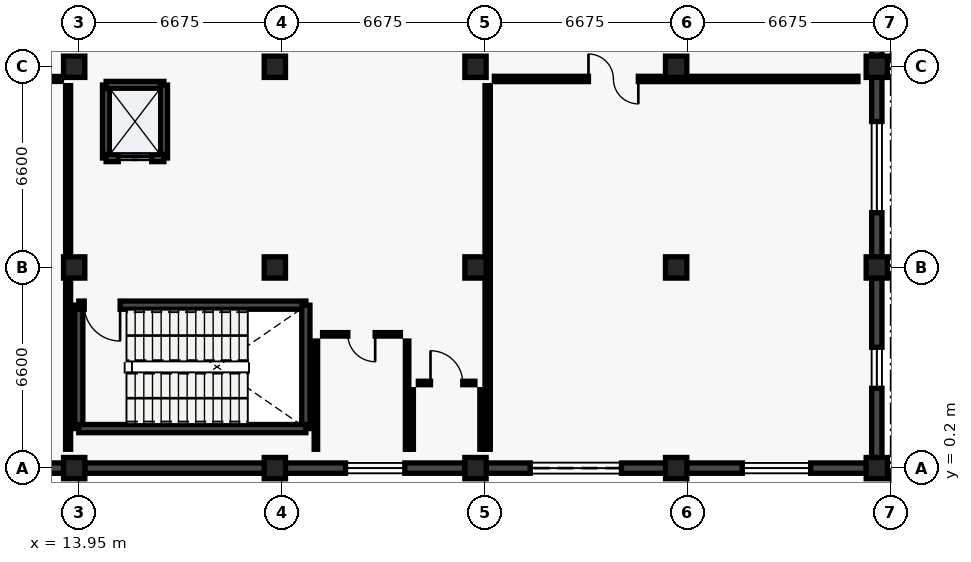
"""IFC4 building model, lengths in metres.
Left out: names, types, materials, properties, quantities, classifications, styles, units other than length and angle.
Written with IfcOpenShell. Run it as: python <this file> out.ifc"""

import sys

from ifc_helpers import new_model, si_unit, direction, frame, frame_2d, origin, origin_2d, place, context, subcontext, project, spatial, rectangle, extrude, element, fill, save


model = new_model("IFC4")
c1 = context("Model", 3, precision=1e-05, world=origin(), true_north=direction((0.0, 1.0)))
c2 = subcontext(c1, "Body", "Model", "MODEL_VIEW")
j1 = project(units=[si_unit("LENGTHUNIT", "METRE"), si_unit("PLANEANGLEUNIT", "RADIAN")], contexts=[c1])
p1 = place(None, origin())
s1 = spatial("IfcSite", under=j1, at=p1, CompositionType="ELEMENT")
p2 = place(p1, origin())
s2 = spatial("IfcBuilding", under=s1, at=p2, CompositionType="ELEMENT")
p3 = place(p2, origin())
s3 = spatial("IfcBuildingStorey", under=s2, at=p3, CompositionType="ELEMENT", Elevation=0.0)
for number, where, z_axis, x_axis in (
    (1, (13.8, 0.2, 0.0), (0.0, 0.0, 1.0), (1.0, 0.0, 0.0)),
    (2, (13.8, 6.8, 0.0), (0.0, 0.0, 1.0), (1.0, 0.0, 0.0)),
    (3, (13.8, 13.4, 0.0), (0.0, 0.0, 1.0), (1.0, 0.0, 0.0)),
    (4, (20.4, 0.2, 0.0), (0.0, 0.0, 1.0), (1.0, 0.0, 0.0)),
    (5, (20.4, 6.8, 0.0), (0.0, 0.0, 1.0), (1.0, 0.0, 0.0)),
    (6, (20.4, 13.4, 0.0), (0.0, 0.0, 1.0), (1.0, 0.0, 0.0)),
    (7, (27.0, 0.2, 0.0), (0.0, 0.0, 1.0), (1.0, 0.0, 0.0)),
    (8, (27.0, 6.8, 0.0), (0.0, 0.0, 1.0), (1.0, 0.0, 0.0)),
    (9, (27.0, 13.4, 0.0), (0.0, 0.0, 1.0), (1.0, 0.0, 0.0)),
    (10, (33.6, 0.2, 0.0), (0.0, 0.0, 1.0), (1.0, 0.0, 0.0)),
    (11, (33.6, 6.8, 0.0), (0.0, 0.0, 1.0), (1.0, 0.0, 0.0)),
    (12, (33.6, 13.4, 0.0), (0.0, 0.0, 1.0), (1.0, 0.0, 0.0)),
    (13, (40.2, 0.2, 0.0), (0.0, 0.0, 1.0), (1.0, 0.0, 0.0)),
    (14, (40.2, 6.8, 0.0), (0.0, 0.0, 1.0), (1.0, 0.0, 0.0)),
    (15, (40.2, 13.4, 0.0), (0.0, 0.0, 1.0), (1.0, 0.0, 0.0)),
):
    element("IfcColumn", number, at=place(p3, frame(where, z_axis=z_axis, x_axis=x_axis)), inside=s3, PredefinedType="COLUMN", context=c2, shape_type="SweptSolid", body=[
        extrude(rectangle(XDim=0.7, YDim=0.7, at=origin_2d()), origin(), (0.0, 0.0, 1.0), 4.88),
    ])
p4 = place(p3, frame((40.2, 19.655, 0.0), z_axis=(0.0, 0.0, 1.0), x_axis=(0.0, -1.0, 0.0)))
e16 = element("IfcWall", 16, at=p4, inside=s3, PredefinedType="SOLIDWALL", context=c2, shape_type="SweptSolid", body=[
    extrude(rectangle(XDim=5.91, YDim=0.34, at=frame_2d((2.955, 0.0))), origin(), (0.0, 0.0, 1.0), 4.415),
])
p5 = place(p4, frame((3.56, 0.0, 0.0)))
e17 = element("IfcOpeningElement", 17, at=p5, cuts=e16, PredefinedType="OPENING", context=c2, shape_type="SweptSolid", body=[
    extrude(rectangle(XDim=2.0, YDim=2.25, at=frame_2d((1.0, 1.125))), frame((0.0, 0.17, 0.0), z_axis=(0.0, -1.0, 0.0), x_axis=(1.0, 0.0, 0.0)), (0.0, 0.0, 1.0), 0.34),
])
p6 = place(p3, frame((40.2, 13.055, 0.0), z_axis=(0.0, 0.0, 1.0), x_axis=(0.0, -1.0, 0.0)))
e18 = element("IfcWall", 18, at=p6, inside=s3, PredefinedType="SOLIDWALL", context=c2, shape_type="SweptSolid", body=[
    extrude(rectangle(XDim=5.91, YDim=0.34, at=frame_2d((2.955, 0.0))), origin(), (0.0, 0.0, 1.0), 4.415),
])
p7 = place(p6, frame((1.455, 0.0, 0.95)))
e19 = element("IfcOpeningElement", 19, at=p7, cuts=e18, PredefinedType="OPENING", context=c2, shape_type="SweptSolid", body=[
    extrude(rectangle(XDim=3.0, YDim=1.65, at=frame_2d((1.5, 0.825))), frame((0.0, 0.17, 0.0), z_axis=(0.0, -1.0, 0.0), x_axis=(1.0, 0.0, 0.0)), (0.0, 0.0, 1.0), 0.34),
])
p8 = place(p3, frame((40.2, 6.455, 0.0), z_axis=(0.0, 0.0, 1.0), x_axis=(0.0, -1.0, 0.0)))
e20 = element("IfcWall", 20, at=p8, inside=s3, PredefinedType="SOLIDWALL", context=c2, shape_type="SweptSolid", body=[
    extrude(rectangle(XDim=5.91, YDim=0.34, at=frame_2d((2.955, 0.0))), origin(), (0.0, 0.0, 1.0), 4.415),
])
p9 = place(p8, frame((2.28, 0.0, 0.95)))
e21 = element("IfcOpeningElement", 21, at=p9, cuts=e20, PredefinedType="OPENING", context=c2, shape_type="SweptSolid", body=[
    extrude(rectangle(XDim=1.35, YDim=1.8, at=frame_2d((0.675, 0.9))), frame((0.0, 0.17, 0.0), z_axis=(0.0, -1.0, 0.0), x_axis=(1.0, 0.0, 0.0)), (0.0, 0.0, 1.0), 0.34),
])
p10 = place(p3, frame((39.855, 0.2, 0.0), z_axis=(0.0, 0.0, 1.0), x_axis=(-1.0, 0.0, 0.0)))
e22 = element("IfcWall", 22, at=p10, inside=s3, PredefinedType="SOLIDWALL", context=c2, shape_type="SweptSolid", body=[
    extrude(rectangle(XDim=5.91, YDim=0.34, at=frame_2d((2.955, 0.0))), origin(), (0.0, 0.0, 1.0), 4.415),
])
p11 = place(p10, frame((1.83, 0.0, 0.95)))
e23 = element("IfcOpeningElement", 23, at=p11, cuts=e22, PredefinedType="OPENING", context=c2, shape_type="SweptSolid", body=[
    extrude(rectangle(XDim=2.25, YDim=1.55, at=frame_2d((1.125, 0.775))), frame((0.0, 0.17, 0.0), z_axis=(0.0, -1.0, 0.0), x_axis=(1.0, 0.0, 0.0)), (0.0, 0.0, 1.0), 0.34),
])
p12 = place(p3, frame((33.255, 0.2, 0.0), z_axis=(0.0, 0.0, 1.0), x_axis=(-1.0, 0.0, 0.0)))
e24 = element("IfcWall", 24, at=p12, inside=s3, PredefinedType="SOLIDWALL", context=c2, shape_type="SweptSolid", body=[
    extrude(rectangle(XDim=5.91, YDim=0.34, at=frame_2d((2.955, 0.0))), origin(), (0.0, 0.0, 1.0), 4.415),
])
p13 = place(p12, frame((1.455, 0.0, 0.0)))
e25 = element("IfcOpeningElement", 25, at=p13, cuts=e24, PredefinedType="OPENING", context=c2, shape_type="SweptSolid", body=[
    extrude(rectangle(XDim=3.0, YDim=2.65, at=frame_2d((1.5, 1.325))), frame((0.0, 0.17, 0.0), z_axis=(0.0, -1.0, 0.0), x_axis=(1.0, 0.0, 0.0)), (0.0, 0.0, 1.0), 0.34),
])
p14 = place(p3, frame((26.655, 0.2, 0.0), z_axis=(0.0, 0.0, 1.0), x_axis=(-1.0, 0.0, 0.0)))
e26 = element("IfcWall", 26, at=p14, inside=s3, PredefinedType="SOLIDWALL", context=c2, shape_type="SweptSolid", body=[
    extrude(rectangle(XDim=5.91, YDim=0.34, at=frame_2d((2.955, 0.0))), origin(), (0.0, 0.0, 1.0), 4.415),
])
p15 = place(p14, frame((1.98, 0.0, 0.95)))
e27 = element("IfcOpeningElement", 27, at=p15, cuts=e26, PredefinedType="OPENING", context=c2, shape_type="SweptSolid", body=[
    extrude(rectangle(XDim=1.95, YDim=1.5, at=frame_2d((0.975, 0.75))), frame((0.0, 0.17, 0.0), z_axis=(0.0, -1.0, 0.0), x_axis=(1.0, 0.0, 0.0)), (0.0, 0.0, 1.0), 0.34),
])
p16 = place(p3, frame((20.055, 0.2, 0.0), z_axis=(0.0, 0.0, 1.0), x_axis=(-1.0, 0.0, 0.0)))
e28 = element("IfcWall", 28, at=p16, inside=s3, PredefinedType="SOLIDWALL", context=c2, shape_type="SweptSolid", body=[
    extrude(rectangle(XDim=5.91, YDim=0.34, at=frame_2d((2.955, 0.0))), origin(), (0.0, 0.0, 1.0), 4.415),
])
p17 = place(p3, frame((13.455, 0.2, 0.0), z_axis=(0.0, 0.0, 1.0), x_axis=(-1.0, 0.0, 0.0)))
e29 = element("IfcWall", 29, at=p17, inside=s3, PredefinedType="SOLIDWALL", context=c2, shape_type="SweptSolid", body=[
    extrude(rectangle(XDim=5.91, YDim=0.34, at=frame_2d((2.955, 0.0))), origin(), (0.0, 0.0, 1.0), 4.415),
])
p18 = place(p17, frame((1.455, 0.0, 0.95)))
e30 = element("IfcOpeningElement", 30, at=p18, cuts=e29, PredefinedType="OPENING", context=c2, shape_type="SweptSolid", body=[
    extrude(rectangle(XDim=3.0, YDim=1.65, at=frame_2d((1.5, 0.825))), frame((0.0, 0.17, 0.0), z_axis=(0.0, -1.0, 0.0), x_axis=(1.0, 0.0, 0.0)), (0.0, 0.0, 1.0), 0.34),
])
p19 = place(p3, frame((13.95, 1.5, 0.0), z_axis=(0.0, 0.0, 1.0), x_axis=(0.0, 1.0, 0.0)))
e31 = element("IfcWall", 31, at=p19, inside=s3, PredefinedType="SHEAR", context=c2, shape_type="SweptSolid", body=[
    extrude(rectangle(XDim=4.06, YDim=0.27, at=frame_2d((2.03, 0.0))), origin(), (0.0, 0.0, 1.0), 4.88),
])
p20 = place(p3, frame((13.95, 5.56, 0.0), z_axis=(0.0, 0.0, 1.0), x_axis=(1.0, 0.0, 0.0)))
e32 = element("IfcWall", 32, at=p20, inside=s3, PredefinedType="SHEAR", context=c2, shape_type="SweptSolid", body=[
    extrude(rectangle(XDim=7.47, YDim=0.27, at=frame_2d((3.735, 0.0))), origin(), (0.0, 0.0, 1.0), 4.88),
])
p21 = place(p20, frame((0.18, 0.0, 0.0)))
e33 = element("IfcOpeningElement", 33, at=p21, cuts=e32, PredefinedType="OPENING", context=c2, shape_type="SweptSolid", body=[
    extrude(rectangle(XDim=1.18, YDim=2.15, at=frame_2d((0.59, 1.075))), frame((0.0, 0.135, 0.0), z_axis=(0.0, -1.0, 0.0), x_axis=(1.0, 0.0, 0.0)), (0.0, 0.0, 1.0), 0.27),
])
p22 = place(p3, frame((21.42, 5.56, 0.0), z_axis=(0.0, 0.0, 1.0), x_axis=(0.0, -1.0, 0.0)))
e34 = element("IfcWall", 34, at=p22, inside=s3, PredefinedType="SHEAR", context=c2, shape_type="SweptSolid", body=[
    extrude(rectangle(XDim=4.06, YDim=0.27, at=frame_2d((2.03, 0.0))), origin(), (0.0, 0.0, 1.0), 4.88),
])
p23 = place(p3, frame((21.42, 1.5, 0.0), z_axis=(0.0, 0.0, 1.0), x_axis=(-1.0, 0.0, 0.0)))
e35 = element("IfcWall", 35, at=p23, inside=s3, PredefinedType="SHEAR", context=c2, shape_type="SweptSolid", body=[
    extrude(rectangle(XDim=7.47, YDim=0.27, at=frame_2d((3.735, 0.0))), origin(), (0.0, 0.0, 1.0), 4.88),
])
p24 = place(p3, frame((14.85, 10.4, 0.0), z_axis=(0.0, 0.0, 1.0), x_axis=(0.0, 1.0, 0.0)))
e36 = element("IfcWall", 36, at=p24, inside=s3, PredefinedType="SHEAR", context=c2, shape_type="SweptSolid", body=[
    extrude(rectangle(XDim=2.4, YDim=0.24, at=frame_2d((1.2, 0.0))), origin(), (0.0, 0.0, 1.0), 4.88),
])
p25 = place(p3, frame((14.85, 12.8, 0.0), z_axis=(0.0, 0.0, 1.0), x_axis=(1.0, 0.0, 0.0)))
e37 = element("IfcWall", 37, at=p25, inside=s3, PredefinedType="SHEAR", context=c2, shape_type="SweptSolid", body=[
    extrude(rectangle(XDim=1.9, YDim=0.24, at=frame_2d((0.95, 0.0))), origin(), (0.0, 0.0, 1.0), 4.88),
])
p26 = place(p3, frame((16.75, 12.8, 0.0), z_axis=(0.0, 0.0, 1.0), x_axis=(0.0, -1.0, 0.0)))
e38 = element("IfcWall", 38, at=p26, inside=s3, PredefinedType="SHEAR", context=c2, shape_type="SweptSolid", body=[
    extrude(rectangle(XDim=2.4, YDim=0.24, at=frame_2d((1.2, 0.0))), origin(), (0.0, 0.0, 1.0), 4.88),
])
p27 = place(p3, frame((16.75, 10.4, 0.0), z_axis=(0.0, 0.0, 1.0), x_axis=(-1.0, 0.0, 0.0)))
e39 = element("IfcWall", 39, at=p27, inside=s3, PredefinedType="SHEAR", context=c2, shape_type="SweptSolid", body=[
    extrude(rectangle(XDim=1.9, YDim=0.24, at=frame_2d((0.95, 0.0))), origin(), (0.0, 0.0, 1.0), 4.88),
])
p28 = place(p27, frame((0.4, 0.0, 0.0)))
e40 = element("IfcOpeningElement", 40, at=p28, cuts=e39, PredefinedType="OPENING", context=c2, shape_type="SweptSolid", body=[
    extrude(rectangle(XDim=1.1, YDim=2.2, at=frame_2d((0.55, 1.1))), frame((0.0, 0.12, 0.0), z_axis=(0.0, -1.0, 0.0), x_axis=(1.0, 0.0, 0.0)), (0.0, 0.0, 1.0), 0.24),
])
p29 = place(p3, frame((24.75, 0.82, 0.0), z_axis=(0.0, 0.0, 1.0), x_axis=(0.0, 1.0, 0.0)))
e41 = element("IfcWall", 41, at=p29, inside=s3, PredefinedType="PARTITIONING", context=c2, shape_type="SweptSolid", body=[
    extrude(rectangle(XDim=3.56, YDim=0.115, at=frame_2d((1.78, 0.0))), origin(), (0.0, 0.0, 1.0), 4.55),
])
p30 = place(p3, frame((24.53, 4.6, 0.0), z_axis=(0.0, 0.0, 1.0), x_axis=(-1.0, 0.0, 0.0)))
e42 = element("IfcWall", 42, at=p30, inside=s3, PredefinedType="PARTITIONING", context=c2, shape_type="SweptSolid", body=[
    extrude(rectangle(XDim=2.56, YDim=0.115, at=frame_2d((1.28, 0.0))), origin(), (0.0, 0.0, 1.0), 4.55),
])
p31 = place(p30, frame((0.83, 0.0, 0.0)))
e43 = element("IfcOpeningElement", 43, at=p31, cuts=e42, PredefinedType="OPENING", context=c2, shape_type="SweptSolid", body=[
    extrude(rectangle(XDim=0.9, YDim=2.1, at=frame_2d((0.45, 1.05))), frame((0.0, 0.058, 0.0), z_axis=(0.0, -1.0, 0.0), x_axis=(1.0, 0.0, 0.0)), (0.0, 0.0, 1.0), 0.115),
])
p32 = place(p3, frame((21.75, 4.38, 0.0), z_axis=(0.0, 0.0, 1.0), x_axis=(0.0, -1.0, 0.0)))
e44 = element("IfcWall", 44, at=p32, inside=s3, PredefinedType="PARTITIONING", context=c2, shape_type="SweptSolid", body=[
    extrude(rectangle(XDim=3.56, YDim=0.115, at=frame_2d((1.78, 0.0))), origin(), (0.0, 0.0, 1.0), 4.55),
])
p33 = place(p3, frame((27.2, 0.82, 0.0), z_axis=(0.0, 0.0, 1.0), x_axis=(0.0, 1.0, 0.0)))
e45 = element("IfcWall", 45, at=p33, inside=s3, PredefinedType="PARTITIONING", context=c2, shape_type="SweptSolid", body=[
    extrude(rectangle(XDim=1.96, YDim=0.115, at=frame_2d((0.98, 0.0))), origin(), (0.0, 0.0, 1.0), 4.215),
])
p34 = place(p3, frame((26.98, 3.0, 0.0), z_axis=(0.0, 0.0, 1.0), x_axis=(-1.0, 0.0, 0.0)))
e46 = element("IfcWall", 46, at=p34, inside=s3, PredefinedType="PARTITIONING", context=c2, shape_type="SweptSolid", body=[
    extrude(rectangle(XDim=1.86, YDim=0.115, at=frame_2d((0.93, 0.0))), origin(), (0.0, 0.0, 1.0), 4.55),
])
p35 = place(p34, frame((0.4, 0.0, 0.0)))
e47 = element("IfcOpeningElement", 47, at=p35, cuts=e46, PredefinedType="OPENING", context=c2, shape_type="SweptSolid", body=[
    extrude(rectangle(XDim=1.06, YDim=2.12, at=frame_2d((0.53, 1.06))), frame((0.0, 0.058, 0.0), z_axis=(0.0, -1.0, 0.0), x_axis=(1.0, 0.0, 0.0)), (0.0, 0.0, 1.0), 0.115),
])
p36 = place(p3, frame((24.9, 2.78, 0.0), z_axis=(0.0, 0.0, 1.0), x_axis=(0.0, -1.0, 0.0)))
e48 = element("IfcWall", 48, at=p36, inside=s3, PredefinedType="PARTITIONING", context=c2, shape_type="SweptSolid", body=[
    extrude(rectangle(XDim=1.96, YDim=0.115, at=frame_2d((0.98, 0.0))), origin(), (0.0, 0.0, 1.0), 4.55),
])
p37 = place(p3, frame((13.6, 0.82, 0.0), z_axis=(0.0, 0.0, 1.0), x_axis=(0.0, 1.0, 0.0)))
e49 = element("IfcWall", 49, at=p37, inside=s3, PredefinedType="PARTITIONING", context=c2, shape_type="SweptSolid", body=[
    extrude(rectangle(XDim=11.96, YDim=0.165, at=frame_2d((5.98, 0.0))), origin(), (0.0, 0.0, 1.0), 4.215),
])
p38 = place(p3, frame((13.38, 13.0, 0.0), z_axis=(0.0, 0.0, 1.0), x_axis=(-1.0, 0.0, 0.0)))
e50 = element("IfcWall", 50, at=p38, inside=s3, PredefinedType="PARTITIONING", context=c2, shape_type="SweptSolid", body=[
    extrude(rectangle(XDim=12.16, YDim=0.165, at=frame_2d((6.08, 0.0))), origin(), (0.0, 0.0, 1.0), 4.55),
])
p39 = place(p38, frame((7.686, 0.0, 0.0)))
e51 = element("IfcOpeningElement", 51, at=p39, cuts=e50, PredefinedType="OPENING", context=c2, shape_type="SweptSolid", body=[
    extrude(rectangle(XDim=1.18, YDim=2.14, at=frame_2d((0.59, 1.07))), frame((0.0, 0.083, 0.0), z_axis=(0.0, -1.0, 0.0), x_axis=(1.0, 0.0, 0.0)), (0.0, 0.0, 1.0), 0.165),
])
p40 = place(p3, frame((39.58, 13.0, 0.0), z_axis=(0.0, 0.0, 1.0), x_axis=(-1.0, 0.0, 0.0)))
e52 = element("IfcWall", 52, at=p40, inside=s3, PredefinedType="SOLIDWALL", context=c2, shape_type="SweptSolid", body=[
    extrude(rectangle(XDim=11.96, YDim=0.175, at=frame_2d((5.98, 0.0))), origin(), (0.0, 0.0, 1.0), 4.55),
])
p41 = place(p40, frame((7.224, 0.0, 0.0)))
e53 = element("IfcOpeningElement", 53, at=p41, cuts=e52, PredefinedType="OPENING", context=c2, shape_type="SweptSolid", body=[
    extrude(rectangle(XDim=1.64, YDim=2.2, at=frame_2d((0.82, 1.1))), frame((0.0, 0.087, 0.0), z_axis=(0.0, -1.0, 0.0), x_axis=(1.0, 0.0, 0.0)), (0.0, 0.0, 1.0), 0.175),
])
p42 = place(p3, frame((27.4, 12.78, 0.0), z_axis=(0.0, 0.0, 1.0), x_axis=(0.0, -1.0, 0.0)))
e54 = element("IfcWall", 54, at=p42, inside=s3, PredefinedType="SOLIDWALL", context=c2, shape_type="SweptSolid", body=[
    extrude(rectangle(XDim=11.96, YDim=0.175, at=frame_2d((5.98, 0.0))), origin(), (0.0, 0.0, 1.0), 4.55),
])
p43 = place(p7, origin())
e55 = element("IfcWindow", 55, at=p43, inside=s3, PartitioningType="SINGLE_PANEL", PredefinedType="WINDOW", context=c2, shape_type="SweptSolid", body=[
    extrude(rectangle(XDim=3.0, YDim=1.65, at=frame_2d((1.5, 0.825))), frame((0.0, 0.03, 0.0), z_axis=(0.0, -1.0, 0.0), x_axis=(1.0, 0.0, 0.0)), (0.0, 0.0, 1.0), 0.06),
])
fill(e19, e55)
p44 = place(p9, origin())
e56 = element("IfcWindow", 56, at=p44, inside=s3, PartitioningType="SINGLE_PANEL", PredefinedType="WINDOW", context=c2, shape_type="SweptSolid", body=[
    extrude(rectangle(XDim=1.35, YDim=1.8, at=frame_2d((0.675, 0.9))), frame((0.0, 0.03, 0.0), z_axis=(0.0, -1.0, 0.0), x_axis=(1.0, 0.0, 0.0)), (0.0, 0.0, 1.0), 0.06),
])
fill(e21, e56)
p45 = place(p11, origin())
e57 = element("IfcWindow", 57, at=p45, inside=s3, PartitioningType="SINGLE_PANEL", PredefinedType="WINDOW", context=c2, shape_type="SweptSolid", body=[
    extrude(rectangle(XDim=2.25, YDim=1.55, at=frame_2d((1.125, 0.775))), frame((0.0, 0.03, 0.0), z_axis=(0.0, -1.0, 0.0), x_axis=(1.0, 0.0, 0.0)), (0.0, 0.0, 1.0), 0.06),
])
fill(e23, e57)
p46 = place(p13, origin())
e58 = element("IfcDoor", 58, at=p46, inside=s3, OperationType="ROLLINGUP", PredefinedType="GATE", context=c2, shape_type="SweptSolid", body=[
    extrude(rectangle(XDim=3.0, YDim=2.65, at=frame_2d((1.5, 1.325))), frame((0.0, 0.025, 0.0), z_axis=(0.0, -1.0, 0.0), x_axis=(1.0, 0.0, 0.0)), (0.0, 0.0, 1.0), 0.05),
])
fill(e25, e58)
p47 = place(p15, origin())
e59 = element("IfcWindow", 59, at=p47, inside=s3, PartitioningType="SINGLE_PANEL", PredefinedType="WINDOW", context=c2, shape_type="SweptSolid", body=[
    extrude(rectangle(XDim=1.95, YDim=1.5, at=frame_2d((0.975, 0.75))), frame((0.0, 0.03, 0.0), z_axis=(0.0, -1.0, 0.0), x_axis=(1.0, 0.0, 0.0)), (0.0, 0.0, 1.0), 0.06),
])
fill(e27, e59)
p48 = place(p21, origin())
e60 = element("IfcDoor", 60, at=p48, inside=s3, OperationType="SINGLE_SWING_RIGHT", PredefinedType="DOOR", context=c2, shape_type="SweptSolid", body=[
    extrude(rectangle(XDim=1.18, YDim=2.15, at=frame_2d((0.59, 1.075))), frame((0.0, 0.025, 0.0), z_axis=(0.0, -1.0, 0.0), x_axis=(1.0, 0.0, 0.0)), (0.0, 0.0, 1.0), 0.05),
])
fill(e33, e60)
p49 = place(p28, origin())
e61 = element("IfcDoor", 61, at=p49, inside=s3, OperationType="SLIDING_TO_LEFT", PredefinedType="DOOR", context=c2, shape_type="SweptSolid", body=[
    extrude(rectangle(XDim=1.1, YDim=2.2, at=frame_2d((0.55, 1.1))), frame((0.0, 0.025, 0.0), z_axis=(0.0, -1.0, 0.0), x_axis=(1.0, 0.0, 0.0)), (0.0, 0.0, 1.0), 0.05),
])
fill(e40, e61)
p50 = place(p31, origin())
e62 = element("IfcDoor", 62, at=p50, inside=s3, OperationType="SINGLE_SWING_LEFT", PredefinedType="DOOR", context=c2, shape_type="SweptSolid", body=[
    extrude(rectangle(XDim=0.9, YDim=2.1, at=frame_2d((0.45, 1.05))), frame((0.0, 0.025, 0.0), z_axis=(0.0, -1.0, 0.0), x_axis=(1.0, 0.0, 0.0)), (0.0, 0.0, 1.0), 0.05),
])
fill(e43, e62)
p51 = place(p35, origin())
e63 = element("IfcDoor", 63, at=p51, inside=s3, OperationType="SINGLE_SWING_RIGHT", PredefinedType="DOOR", context=c2, shape_type="SweptSolid", body=[
    extrude(rectangle(XDim=1.06, YDim=2.12, at=frame_2d((0.53, 1.06))), frame((0.0, 0.025, 0.0), z_axis=(0.0, -1.0, 0.0), x_axis=(1.0, 0.0, 0.0)), (0.0, 0.0, 1.0), 0.05),
])
fill(e47, e63)
p52 = place(p41, origin())
e64 = element("IfcDoor", 64, at=p52, inside=s3, OperationType="DOUBLE_DOOR_SINGLE_SWING", PredefinedType="DOOR", context=c2, shape_type="SweptSolid", body=[
    extrude(rectangle(XDim=1.64, YDim=2.2, at=frame_2d((0.82, 1.1))), frame((0.0, 0.025, 0.0), z_axis=(0.0, -1.0, 0.0), x_axis=(1.0, 0.0, 0.0)), (0.0, 0.0, 1.0), 0.05),
])
fill(e53, e64)
save(model, sys.argv[1])
